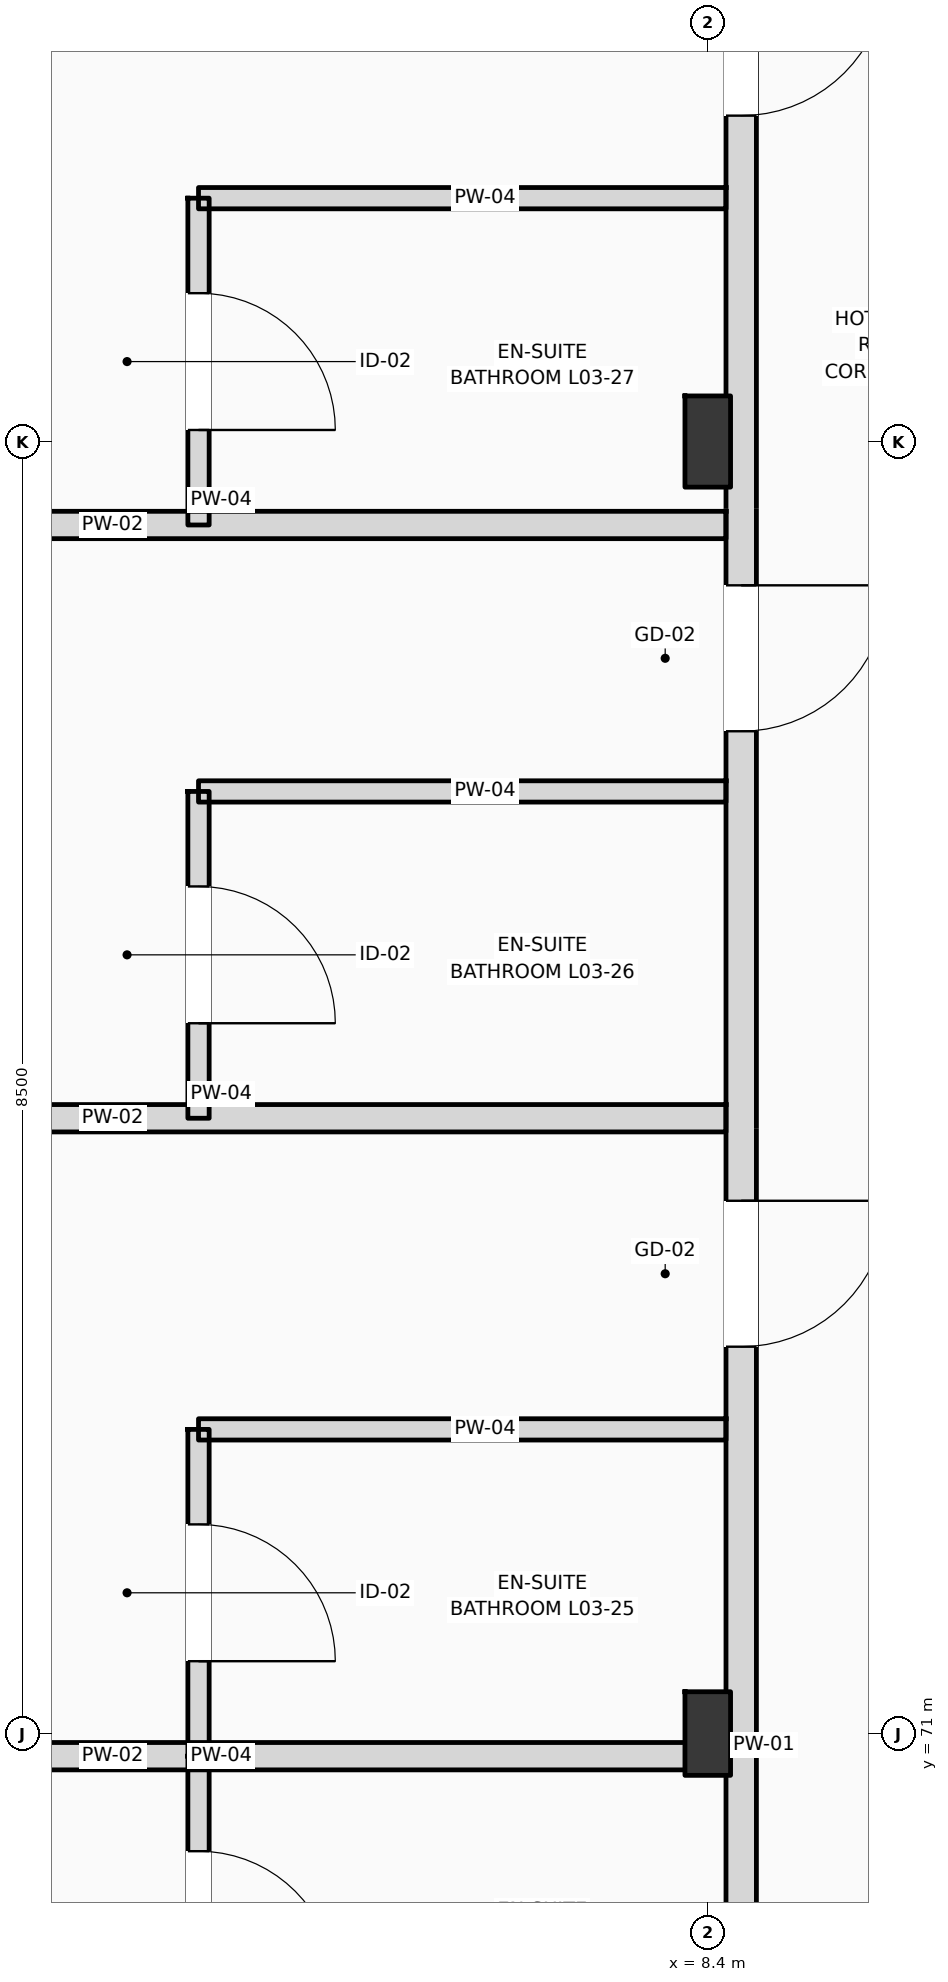
"""IFC4 building model, lengths in metres.
Left out: names, types, materials, properties, quantities, classifications, styles, units other than length and angle.
Written with IfcOpenShell. Run it as: python <this file> out.ifc"""

import sys

from ifc_helpers import new_model, si_unit, direction, frame, frame_2d, origin, origin_2d, place, context, subcontext, project, spatial, rectangle, i_section, extrude, element, fill, save


model = new_model("IFC4")
c1 = context("Model", 3, precision=1e-05, world=origin(), true_north=direction((0.0, 1.0)))
c2 = subcontext(c1, "Body", "Model", "MODEL_VIEW")
j1 = project(units=[si_unit("LENGTHUNIT", "METRE"), si_unit("PLANEANGLEUNIT", "RADIAN")], contexts=[c1])
p1 = place(None, origin())
s1 = spatial("IfcSite", under=j1, at=p1, CompositionType="ELEMENT")
p2 = place(p1, origin())
s2 = spatial("IfcBuilding", under=s1, at=p2, CompositionType="ELEMENT")
p3 = place(p2, frame((0.0, 0.0, 16.2)))
s3 = spatial("IfcBuildingStorey", under=s2, at=p3, CompositionType="ELEMENT", Elevation=16.2)
p4 = place(p3, frame((8.4, 71.0, 0.0), z_axis=(0.0, 0.0, 1.0), x_axis=(1.0, 0.0, 0.0)))
e1 = element("IfcColumn", 1, at=p4, inside=s3, PredefinedType="COLUMN", context=c2, shape_type="SweptSolid", body=[
    extrude(i_section(OverallWidth=0.3, OverallDepth=0.55, WebThickness=0.015, FlangeThickness=0.029, FilletRadius=0.027, at=origin_2d()), origin(), (0.0, 0.0, 1.0), 4.2),
])
p5 = place(p3, frame((8.4, 79.5, 0.0), z_axis=(0.0, 0.0, 1.0), x_axis=(1.0, 0.0, 0.0)))
e2 = element("IfcColumn", 2, at=p5, inside=s3, PredefinedType="COLUMN", context=c2, shape_type="SweptSolid", body=[
    extrude(i_section(OverallWidth=0.3, OverallDepth=0.6, WebThickness=0.015, FlangeThickness=0.03, FilletRadius=0.027, at=origin_2d()), origin(), (0.0, 0.0, 1.0), 4.2),
])
p6 = place(p3, frame((8.62, 62.64, 0.0), z_axis=(0.0, 0.0, 1.0), x_axis=(0.0, 1.0, 0.0)))
e3 = element("IfcWall", 3, at=p6, inside=s3, PredefinedType="PARTITIONING", context=c2, shape_type="SweptSolid", body=[
    extrude(rectangle(XDim=32.66, YDim=0.2, at=frame_2d((16.33, 0.0))), origin(), (0.0, 0.0, 1.0), 3.51),
])
p7 = place(p6, frame((2.829, 0.0, 0.0)))
e4 = element("IfcOpeningElement", 4, at=p7, cuts=e3, PredefinedType="OPENING", context=c2, shape_type="SweptSolid", body=[
    extrude(rectangle(XDim=0.96, YDim=2.2, at=frame_2d((0.48, 1.1))), frame((0.0, 0.11, 0.0), z_axis=(0.0, -1.0, 0.0), x_axis=(1.0, 0.0, 0.0)), (0.0, 0.0, 1.0), 0.22),
])
p8 = place(p6, frame((4.704, 0.0, 0.0)))
e5 = element("IfcOpeningElement", 5, at=p8, cuts=e3, PredefinedType="OPENING", context=c2, shape_type="SweptSolid", body=[
    extrude(rectangle(XDim=0.96, YDim=2.2, at=frame_2d((0.48, 1.1))), frame((0.0, 0.11, 0.0), z_axis=(0.0, -1.0, 0.0), x_axis=(1.0, 0.0, 0.0)), (0.0, 0.0, 1.0), 0.22),
])
p9 = place(p6, frame((10.905, 0.0, 0.0)))
e6 = element("IfcOpeningElement", 6, at=p9, cuts=e3, PredefinedType="OPENING", context=c2, shape_type="SweptSolid", body=[
    extrude(rectangle(XDim=0.96, YDim=2.2, at=frame_2d((0.48, 1.1))), frame((0.0, 0.11, 0.0), z_axis=(0.0, -1.0, 0.0), x_axis=(1.0, 0.0, 0.0)), (0.0, 0.0, 1.0), 0.22),
])
p10 = place(p6, frame((14.954, 0.0, 0.0)))
e7 = element("IfcOpeningElement", 7, at=p10, cuts=e3, PredefinedType="OPENING", context=c2, shape_type="SweptSolid", body=[
    extrude(rectangle(XDim=0.96, YDim=2.2, at=frame_2d((0.48, 1.1))), frame((0.0, 0.11, 0.0), z_axis=(0.0, -1.0, 0.0), x_axis=(1.0, 0.0, 0.0)), (0.0, 0.0, 1.0), 0.22),
])
p11 = place(p6, frame((19.004, 0.0, 0.0)))
e8 = element("IfcOpeningElement", 8, at=p11, cuts=e3, PredefinedType="OPENING", context=c2, shape_type="SweptSolid", body=[
    extrude(rectangle(XDim=0.96, YDim=2.2, at=frame_2d((0.48, 1.1))), frame((0.0, 0.11, 0.0), z_axis=(0.0, -1.0, 0.0), x_axis=(1.0, 0.0, 0.0)), (0.0, 0.0, 1.0), 0.22),
])
p12 = place(p6, frame((23.055, 0.0, 0.0)))
e9 = element("IfcOpeningElement", 9, at=p12, cuts=e3, PredefinedType="OPENING", context=c2, shape_type="SweptSolid", body=[
    extrude(rectangle(XDim=0.96, YDim=2.2, at=frame_2d((0.48, 1.1))), frame((0.0, 0.11, 0.0), z_axis=(0.0, -1.0, 0.0), x_axis=(1.0, 0.0, 0.0)), (0.0, 0.0, 1.0), 0.22),
])
p13 = place(p6, frame((27.104, 0.0, 0.0)))
e10 = element("IfcOpeningElement", 10, at=p13, cuts=e3, PredefinedType="OPENING", context=c2, shape_type="SweptSolid", body=[
    extrude(rectangle(XDim=0.96, YDim=2.2, at=frame_2d((0.48, 1.1))), frame((0.0, 0.11, 0.0), z_axis=(0.0, -1.0, 0.0), x_axis=(1.0, 0.0, 0.0)), (0.0, 0.0, 1.0), 0.22),
])
p14 = place(p6, frame((31.179, 0.0, 0.0)))
e11 = element("IfcOpeningElement", 11, at=p14, cuts=e3, PredefinedType="OPENING", context=c2, shape_type="SweptSolid", body=[
    extrude(rectangle(XDim=0.96, YDim=2.2, at=frame_2d((0.48, 1.1))), frame((0.0, 0.11, 0.0), z_axis=(0.0, -1.0, 0.0), x_axis=(1.0, 0.0, 0.0)), (0.0, 0.0, 1.0), 0.22),
])
p15 = place(p3, frame((0.15, 70.851, 0.0), z_axis=(0.0, 0.0, 1.0), x_axis=(1.0, 0.0, 0.0)))
e12 = element("IfcWall", 12, at=p15, inside=s3, PredefinedType="PARTITIONING", context=c2, shape_type="SweptSolid", body=[
    extrude(rectangle(XDim=8.37, YDim=0.18, at=frame_2d((4.185, 0.0))), origin(), (0.0, 0.0, 1.0), 3.36),
])
p16 = place(p3, frame((5.05, 68.701, 0.0), z_axis=(0.0, 0.0, 1.0), x_axis=(0.0, 1.0, 0.0)))
e13 = element("IfcWall", 13, at=p16, inside=s3, PredefinedType="PARTITIONING", context=c2, shape_type="SweptSolid", body=[
    extrude(rectangle(XDim=2.15, YDim=0.14, at=frame_2d((1.075, 0.0))), origin(), (0.0, 0.0, 1.0), 3.92),
])
p17 = place(p16, frame((0.625, 0.0, 0.0)))
e14 = element("IfcOpeningElement", 14, at=p17, cuts=e13, PredefinedType="OPENING", context=c2, shape_type="SweptSolid", body=[
    extrude(rectangle(XDim=0.9, YDim=2.1, at=frame_2d((0.45, 1.05))), frame((0.0, 0.08, 0.0), z_axis=(0.0, -1.0, 0.0), x_axis=(1.0, 0.0, 0.0)), (0.0, 0.0, 1.0), 0.16),
])
p18 = place(p3, frame((0.15, 75.048, 0.0), z_axis=(0.0, 0.0, 1.0), x_axis=(1.0, 0.0, 0.0)))
e15 = element("IfcWall", 15, at=p18, inside=s3, PredefinedType="PARTITIONING", context=c2, shape_type="SweptSolid", body=[
    extrude(rectangle(XDim=8.37, YDim=0.18, at=frame_2d((4.185, 0.0))), origin(), (0.0, 0.0, 1.0), 3.92),
])
p19 = place(p3, frame((5.05, 73.001, 0.0), z_axis=(0.0, 0.0, 1.0), x_axis=(1.0, 0.0, 0.0)))
e16 = element("IfcWall", 16, at=p19, inside=s3, PredefinedType="PARTITIONING", context=c2, shape_type="SweptSolid", body=[
    extrude(rectangle(XDim=3.47, YDim=0.14, at=frame_2d((1.735, 0.0))), origin(), (0.0, 0.0, 1.0), 3.92),
])
p20 = place(p3, frame((5.05, 70.851, 0.0), z_axis=(0.0, 0.0, 1.0), x_axis=(0.0, 1.0, 0.0)))
e17 = element("IfcWall", 17, at=p20, inside=s3, PredefinedType="PARTITIONING", context=c2, shape_type="SweptSolid", body=[
    extrude(rectangle(XDim=2.15, YDim=0.14, at=frame_2d((1.075, 0.0))), origin(), (0.0, 0.0, 1.0), 3.92),
])
p21 = place(p20, frame((0.625, 0.0, 0.0)))
e18 = element("IfcOpeningElement", 18, at=p21, cuts=e17, PredefinedType="OPENING", context=c2, shape_type="SweptSolid", body=[
    extrude(rectangle(XDim=0.9, YDim=2.1, at=frame_2d((0.45, 1.05))), frame((0.0, 0.08, 0.0), z_axis=(0.0, -1.0, 0.0), x_axis=(1.0, 0.0, 0.0)), (0.0, 0.0, 1.0), 0.16),
])
p22 = place(p3, frame((0.15, 78.951, 0.0), z_axis=(0.0, 0.0, 1.0), x_axis=(1.0, 0.0, 0.0)))
e19 = element("IfcWall", 19, at=p22, inside=s3, PredefinedType="PARTITIONING", context=c2, shape_type="SweptSolid", body=[
    extrude(rectangle(XDim=8.37, YDim=0.18, at=frame_2d((4.185, 0.0))), origin(), (0.0, 0.0, 1.0), 3.92),
])
p23 = place(p3, frame((5.05, 77.198, 0.0), z_axis=(0.0, 0.0, 1.0), x_axis=(1.0, 0.0, 0.0)))
e20 = element("IfcWall", 20, at=p23, inside=s3, PredefinedType="PARTITIONING", context=c2, shape_type="SweptSolid", body=[
    extrude(rectangle(XDim=3.47, YDim=0.14, at=frame_2d((1.735, 0.0))), origin(), (0.0, 0.0, 1.0), 3.92),
])
p24 = place(p3, frame((5.05, 75.048, 0.0), z_axis=(0.0, 0.0, 1.0), x_axis=(0.0, 1.0, 0.0)))
e21 = element("IfcWall", 21, at=p24, inside=s3, PredefinedType="PARTITIONING", context=c2, shape_type="SweptSolid", body=[
    extrude(rectangle(XDim=2.15, YDim=0.14, at=frame_2d((1.075, 0.0))), origin(), (0.0, 0.0, 1.0), 3.92),
])
p25 = place(p24, frame((0.625, 0.0, 0.0)))
e22 = element("IfcOpeningElement", 22, at=p25, cuts=e21, PredefinedType="OPENING", context=c2, shape_type="SweptSolid", body=[
    extrude(rectangle(XDim=0.9, YDim=2.1, at=frame_2d((0.45, 1.05))), frame((0.0, 0.08, 0.0), z_axis=(0.0, -1.0, 0.0), x_axis=(1.0, 0.0, 0.0)), (0.0, 0.0, 1.0), 0.16),
])
p26 = place(p3, frame((5.05, 81.101, 0.0), z_axis=(0.0, 0.0, 1.0), x_axis=(1.0, 0.0, 0.0)))
e23 = element("IfcWall", 23, at=p26, inside=s3, PredefinedType="PARTITIONING", context=c2, shape_type="SweptSolid", body=[
    extrude(rectangle(XDim=3.47, YDim=0.14, at=frame_2d((1.735, 0.0))), origin(), (0.0, 0.0, 1.0), 3.92),
])
p27 = place(p3, frame((5.05, 78.951, 0.0), z_axis=(0.0, 0.0, 1.0), x_axis=(0.0, 1.0, 0.0)))
e24 = element("IfcWall", 24, at=p27, inside=s3, PredefinedType="PARTITIONING", context=c2, shape_type="SweptSolid", body=[
    extrude(rectangle(XDim=2.15, YDim=0.14, at=frame_2d((1.075, 0.0))), origin(), (0.0, 0.0, 1.0), 3.92),
])
p28 = place(p27, frame((0.625, 0.0, 0.0)))
e25 = element("IfcOpeningElement", 25, at=p28, cuts=e24, PredefinedType="OPENING", context=c2, shape_type="SweptSolid", body=[
    extrude(rectangle(XDim=0.9, YDim=2.1, at=frame_2d((0.45, 1.05))), frame((0.0, 0.08, 0.0), z_axis=(0.0, -1.0, 0.0), x_axis=(1.0, 0.0, 0.0)), (0.0, 0.0, 1.0), 0.16),
])
p29 = place(p17, frame((0.9, 0.0, 0.0), z_axis=(0.0, 0.0, 1.0), x_axis=(-1.0, 0.0, 0.0)))
e26 = element("IfcDoor", 26, at=p29, inside=s3, OperationType="SINGLE_SWING_LEFT", PredefinedType="DOOR", context=c2, shape_type="SweptSolid", body=[
    extrude(rectangle(XDim=0.9, YDim=2.1, at=frame_2d((0.45, 1.05))), frame((0.0, 0.025, 0.0), z_axis=(0.0, -1.0, 0.0), x_axis=(1.0, 0.0, 0.0)), (0.0, 0.0, 1.0), 0.05),
])
fill(e14, e26)
p30 = place(p9, frame((0.96, 0.0, 0.0), z_axis=(0.0, 0.0, 1.0), x_axis=(-1.0, 0.0, 0.0)))
e27 = element("IfcDoor", 27, at=p30, inside=s3, OperationType="SINGLE_SWING_RIGHT", PredefinedType="DOOR", context=c2, shape_type="SweptSolid", body=[
    extrude(rectangle(XDim=0.96, YDim=2.2, at=frame_2d((0.48, 1.1))), frame((0.0, 0.025, 0.0), z_axis=(0.0, -1.0, 0.0), x_axis=(1.0, 0.0, 0.0)), (0.0, 0.0, 1.0), 0.05),
])
fill(e6, e27)
p31 = place(p21, frame((0.9, 0.0, 0.0), z_axis=(0.0, 0.0, 1.0), x_axis=(-1.0, 0.0, 0.0)))
e28 = element("IfcDoor", 28, at=p31, inside=s3, OperationType="SINGLE_SWING_LEFT", PredefinedType="DOOR", context=c2, shape_type="SweptSolid", body=[
    extrude(rectangle(XDim=0.9, YDim=2.1, at=frame_2d((0.45, 1.05))), frame((0.0, 0.025, 0.0), z_axis=(0.0, -1.0, 0.0), x_axis=(1.0, 0.0, 0.0)), (0.0, 0.0, 1.0), 0.05),
])
fill(e18, e28)
p32 = place(p10, frame((0.96, 0.0, 0.0), z_axis=(0.0, 0.0, 1.0), x_axis=(-1.0, 0.0, 0.0)))
e29 = element("IfcDoor", 29, at=p32, inside=s3, OperationType="SINGLE_SWING_RIGHT", PredefinedType="DOOR", context=c2, shape_type="SweptSolid", body=[
    extrude(rectangle(XDim=0.96, YDim=2.2, at=frame_2d((0.48, 1.1))), frame((0.0, 0.025, 0.0), z_axis=(0.0, -1.0, 0.0), x_axis=(1.0, 0.0, 0.0)), (0.0, 0.0, 1.0), 0.05),
])
fill(e7, e29)
p33 = place(p25, frame((0.9, 0.0, 0.0), z_axis=(0.0, 0.0, 1.0), x_axis=(-1.0, 0.0, 0.0)))
e30 = element("IfcDoor", 30, at=p33, inside=s3, OperationType="SINGLE_SWING_LEFT", PredefinedType="DOOR", context=c2, shape_type="SweptSolid", body=[
    extrude(rectangle(XDim=0.9, YDim=2.1, at=frame_2d((0.45, 1.05))), frame((0.0, 0.025, 0.0), z_axis=(0.0, -1.0, 0.0), x_axis=(1.0, 0.0, 0.0)), (0.0, 0.0, 1.0), 0.05),
])
fill(e22, e30)
p34 = place(p11, frame((0.96, 0.0, 0.0), z_axis=(0.0, 0.0, 1.0), x_axis=(-1.0, 0.0, 0.0)))
e31 = element("IfcDoor", 31, at=p34, inside=s3, OperationType="SINGLE_SWING_RIGHT", PredefinedType="DOOR", context=c2, shape_type="SweptSolid", body=[
    extrude(rectangle(XDim=0.96, YDim=2.2, at=frame_2d((0.48, 1.1))), frame((0.0, 0.025, 0.0), z_axis=(0.0, -1.0, 0.0), x_axis=(1.0, 0.0, 0.0)), (0.0, 0.0, 1.0), 0.05),
])
fill(e8, e31)
p35 = place(p28, frame((0.9, 0.0, 0.0), z_axis=(0.0, 0.0, 1.0), x_axis=(-1.0, 0.0, 0.0)))
e32 = element("IfcDoor", 32, at=p35, inside=s3, OperationType="SINGLE_SWING_LEFT", PredefinedType="DOOR", context=c2, shape_type="SweptSolid", body=[
    extrude(rectangle(XDim=0.9, YDim=2.1, at=frame_2d((0.45, 1.05))), frame((0.0, 0.025, 0.0), z_axis=(0.0, -1.0, 0.0), x_axis=(1.0, 0.0, 0.0)), (0.0, 0.0, 1.0), 0.05),
])
fill(e25, e32)
save(model, sys.argv[1])
